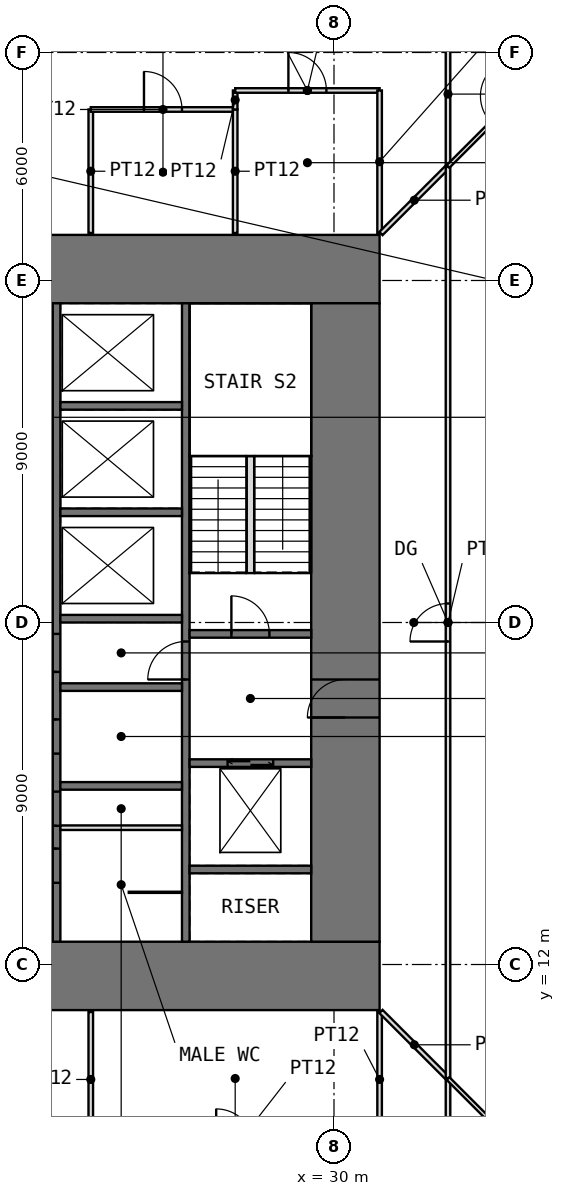
"""IFC4 building model, lengths in metres.
Left out: names, types, materials, properties, quantities, classifications, styles, units other than length and angle.
Written with IfcOpenShell. Run it as: python <this file> out.ifc"""

import sys

from ifc_helpers import new_model, si_unit, direction, frame, frame_2d, origin, place, context, subcontext, project, spatial, rectangle, extrude, element, fill, save


model = new_model("IFC4")
c1 = context("Model", 3, precision=1e-05, world=origin(), true_north=direction((0.0, 1.0)))
c2 = subcontext(c1, "Body", "Model", "MODEL_VIEW")
j1 = project(units=[si_unit("LENGTHUNIT", "METRE"), si_unit("PLANEANGLEUNIT", "RADIAN")], contexts=[c1])
p1 = place(None, origin())
s1 = spatial("IfcSite", under=j1, at=p1, CompositionType="ELEMENT")
p2 = place(p1, origin())
s2 = spatial("IfcBuilding", under=s1, at=p2, CompositionType="ELEMENT")
p3 = place(p2, frame((0.0, 0.0, 34.5)))
s3 = spatial("IfcBuildingStorey", under=s2, at=p3, CompositionType="ELEMENT", Elevation=34.5)
p4 = place(p3, frame((10.8, 11.7, -0.05), z_axis=(0.0, 0.0, 1.0), x_axis=(1.0, 0.0, 0.0)))
e1 = element("IfcWall", 1, at=p4, inside=s3, PredefinedType="SHEAR", context=c2, shape_type="SweptSolid", body=[
    extrude(rectangle(XDim=20.4, YDim=1.8, at=frame_2d((10.2, 0.0))), origin(), (0.0, 0.0, 1.0), 4.0),
])
p5 = place(p4, frame((9.2, 0.0, 0.05)))
e2 = element("IfcOpeningElement", 2, at=p5, cuts=e1, PredefinedType="OPENING", context=c2, shape_type="SweptSolid", body=[
    extrude(rectangle(XDim=2.0, YDim=2.2, at=frame_2d((1.0, 1.1))), frame((0.0, 0.91, 0.0), z_axis=(0.0, -1.0, 0.0), x_axis=(1.0, 0.0, 0.0)), (0.0, 0.0, 1.0), 1.82),
])
p6 = place(p3, frame((10.8, 30.3, -0.05), z_axis=(0.0, 0.0, 1.0), x_axis=(1.0, 0.0, 0.0)))
e3 = element("IfcWall", 3, at=p6, inside=s3, PredefinedType="SHEAR", context=c2, shape_type="SweptSolid", body=[
    extrude(rectangle(XDim=20.4, YDim=1.8, at=frame_2d((10.2, 0.0))), origin(), (0.0, 0.0, 1.0), 4.0),
])
p7 = place(p6, frame((9.2, 0.0, 0.05)))
e4 = element("IfcOpeningElement", 4, at=p7, cuts=e3, PredefinedType="OPENING", context=c2, shape_type="SweptSolid", body=[
    extrude(rectangle(XDim=2.0, YDim=2.2, at=frame_2d((1.0, 1.1))), frame((0.0, 0.91, 0.0), z_axis=(0.0, -1.0, 0.0), x_axis=(1.0, 0.0, 0.0)), (0.0, 0.0, 1.0), 1.82),
])
p8 = place(p3, frame((30.3, 12.6, -0.05), z_axis=(0.0, 0.0, 1.0), x_axis=(0.0, 1.0, 0.0)))
e5 = element("IfcWall", 5, at=p8, inside=s3, PredefinedType="SHEAR", context=c2, shape_type="SweptSolid", body=[
    extrude(rectangle(XDim=16.8, YDim=1.8, at=frame_2d((8.4, 0.0))), origin(), (0.0, 0.0, 1.0), 4.0),
])
p9 = place(p8, frame((5.9, 0.0, 0.05)))
e6 = element("IfcOpeningElement", 6, at=p9, cuts=e5, PredefinedType="OPENING", context=c2, shape_type="SweptSolid", body=[
    extrude(rectangle(XDim=1.0, YDim=2.2, at=frame_2d((0.5, 1.1))), frame((0.0, 0.91, 0.0), z_axis=(0.0, -1.0, 0.0), x_axis=(1.0, 0.0, 0.0)), (0.0, 0.0, 1.0), 1.82),
])
p10 = place(p3, frame((22.7, 12.6, -0.05), z_axis=(0.0, 0.0, 1.0), x_axis=(0.0, 1.0, 0.0)))
e7 = element("IfcWall", 7, at=p10, inside=s3, PredefinedType="SHEAR", context=c2, shape_type="SweptSolid", body=[
    extrude(rectangle(XDim=16.8, YDim=0.2, at=frame_2d((8.4, 0.0))), origin(), (0.0, 0.0, 1.0), 4.0),
])
p11 = place(p10, frame((3.05, 0.0, 0.05)))
e8 = element("IfcOpeningElement", 8, at=p11, cuts=e7, PredefinedType="OPENING", context=c2, shape_type="SweptSolid", body=[
    extrude(rectangle(XDim=0.9, YDim=2.2, at=frame_2d((0.45, 1.1))), frame((0.0, 0.11, 0.0), z_axis=(0.0, -1.0, 0.0), x_axis=(1.0, 0.0, 0.0)), (0.0, 0.0, 1.0), 0.22),
])
p12 = place(p10, frame((7.1, 0.0, 0.05)))
e9 = element("IfcOpeningElement", 9, at=p12, cuts=e7, PredefinedType="OPENING", context=c2, shape_type="SweptSolid", body=[
    extrude(rectangle(XDim=1.0, YDim=2.2, at=frame_2d((0.5, 1.1))), frame((0.0, 0.11, 0.0), z_axis=(0.0, -1.0, 0.0), x_axis=(1.0, 0.0, 0.0)), (0.0, 0.0, 1.0), 0.22),
])
p13 = place(p10, frame((1.55, 0.0, 0.05)))
e10 = element("IfcOpeningElement", 10, at=p13, cuts=e7, PredefinedType="OPENING", context=c2, shape_type="SweptSolid", body=[
    extrude(rectangle(XDim=0.9, YDim=2.2, at=frame_2d((0.45, 1.1))), frame((0.0, 0.11, 0.0), z_axis=(0.0, -1.0, 0.0), x_axis=(1.0, 0.0, 0.0)), (0.0, 0.0, 1.0), 0.22),
])
p14 = place(p10, frame((4.95, 0.0, 0.05)))
e11 = element("IfcOpeningElement", 11, at=p14, cuts=e7, PredefinedType="OPENING", context=c2, shape_type="SweptSolid", body=[
    extrude(rectangle(XDim=0.9, YDim=2.2, at=frame_2d((0.45, 1.1))), frame((0.0, 0.11, 0.0), z_axis=(0.0, -1.0, 0.0), x_axis=(1.0, 0.0, 0.0)), (0.0, 0.0, 1.0), 0.22),
])
p15 = place(p3, frame((26.1, 12.6, -0.05), z_axis=(0.0, 0.0, 1.0), x_axis=(0.0, 1.0, 0.0)))
e12 = element("IfcWall", 12, at=p15, inside=s3, PredefinedType="SHEAR", context=c2, shape_type="SweptSolid", body=[
    extrude(rectangle(XDim=16.8, YDim=0.2, at=frame_2d((8.4, 0.0))), origin(), (0.0, 0.0, 1.0), 4.0),
])
p16 = place(p15, frame((6.9, 0.0, 0.05)))
e13 = element("IfcOpeningElement", 13, at=p16, cuts=e12, PredefinedType="OPENING", context=c2, shape_type="SweptSolid", body=[
    extrude(rectangle(XDim=1.0, YDim=2.2, at=frame_2d((0.5, 1.1))), frame((0.0, 0.11, 0.0), z_axis=(0.0, -1.0, 0.0), x_axis=(1.0, 0.0, 0.0)), (0.0, 0.0, 1.0), 0.22),
])
for number, where, z_axis, x_axis in (
    (14, (22.8, 16.7, -0.05), (0.0, 0.0, 1.0), (1.0, 0.0, 0.0)),
    (15, (22.8, 19.3, -0.05), (0.0, 0.0, 1.0), (1.0, 0.0, 0.0)),
    (16, (22.8, 21.1, -0.05), (0.0, 0.0, 1.0), (1.0, 0.0, 0.0)),
    (17, (22.8, 23.9, -0.05), (0.0, 0.0, 1.0), (1.0, 0.0, 0.0)),
    (18, (22.8, 26.7, -0.05), (0.0, 0.0, 1.0), (1.0, 0.0, 0.0)),
    (19, (26.2, 14.5, -0.05), (0.0, 0.0, 1.0), (1.0, 0.0, 0.0)),
):
    element("IfcWall", number, at=place(p3, frame(where, z_axis=z_axis, x_axis=x_axis)), inside=s3, PredefinedType="SHEAR", context=c2, shape_type="SweptSolid", body=[
        extrude(rectangle(XDim=3.2, YDim=0.2, at=frame_2d((1.6, 0.0))), origin(), (0.0, 0.0, 1.0), 4.0),
    ])
p17 = place(p3, frame((26.2, 17.3, -0.05), z_axis=(0.0, 0.0, 1.0), x_axis=(1.0, 0.0, 0.0)))
e20 = element("IfcWall", 20, at=p17, inside=s3, PredefinedType="SHEAR", context=c2, shape_type="SweptSolid", body=[
    extrude(rectangle(XDim=3.2, YDim=0.2, at=frame_2d((1.6, 0.0))), origin(), (0.0, 0.0, 1.0), 4.0),
])
p18 = place(p17, frame((1.0, 0.0, 0.05)))
e21 = element("IfcOpeningElement", 21, at=p18, cuts=e20, PredefinedType="OPENING", context=c2, shape_type="SweptSolid", body=[
    extrude(rectangle(XDim=1.2, YDim=2.2, at=frame_2d((0.6, 1.1))), frame((0.0, 0.11, 0.0), z_axis=(0.0, -1.0, 0.0), x_axis=(1.0, 0.0, 0.0)), (0.0, 0.0, 1.0), 0.22),
])
p19 = place(p3, frame((26.2, 20.7, -0.05), z_axis=(0.0, 0.0, 1.0), x_axis=(1.0, 0.0, 0.0)))
e22 = element("IfcWall", 22, at=p19, inside=s3, PredefinedType="SHEAR", context=c2, shape_type="SweptSolid", body=[
    extrude(rectangle(XDim=3.2, YDim=0.2, at=frame_2d((1.6, 0.0))), origin(), (0.0, 0.0, 1.0), 4.0),
])
p20 = place(p19, frame((1.1, 0.0, 0.05)))
e23 = element("IfcOpeningElement", 23, at=p20, cuts=e22, PredefinedType="OPENING", context=c2, shape_type="SweptSolid", body=[
    extrude(rectangle(XDim=1.0, YDim=2.2, at=frame_2d((0.5, 1.1))), frame((0.0, 0.11, 0.0), z_axis=(0.0, -1.0, 0.0), x_axis=(1.0, 0.0, 0.0)), (0.0, 0.0, 1.0), 0.22),
])
p21 = place(p3, frame((22.8, 15.6, 0.0), z_axis=(0.0, 0.0, 1.0), x_axis=(1.0, 0.0, 0.0)))
e24 = element("IfcWall", 24, at=p21, inside=s3, PredefinedType="PARTITIONING", context=c2, shape_type="SweptSolid", body=[
    extrude(rectangle(XDim=3.2, YDim=0.12, at=frame_2d((1.6, 0.0))), origin(), (0.0, 0.0, 1.0), 3.75),
])
p22 = place(p3, frame((24.6, 13.9, 0.0), z_axis=(0.0, 0.0, 1.0), x_axis=(1.0, 0.0, 0.0)))
e25 = element("IfcWall", 25, at=p22, inside=s3, PredefinedType="PARTITIONING", context=c2, shape_type="SweptSolid", body=[
    extrude(rectangle(XDim=1.4, YDim=0.03, at=frame_2d((0.7, 0.0))), origin(), (0.0, 0.0, 1.0), 3.75),
])
p23 = place(p3, frame((23.6, 7.2, 0.0), z_axis=(0.0, 0.0, 1.0), x_axis=(0.0, 1.0, 0.0)))
e26 = element("IfcWall", 26, at=p23, inside=s3, PredefinedType="PARTITIONING", context=c2, shape_type="SweptSolid", body=[
    extrude(rectangle(XDim=3.55, YDim=0.12, at=frame_2d((1.775, 0.0))), origin(), (0.0, 0.0, 1.0), 3.75),
])
p24 = place(p3, frame((23.6, 31.25, 0.0), z_axis=(0.0, 0.0, 1.0), x_axis=(0.0, 1.0, 0.0)))
e27 = element("IfcWall", 27, at=p24, inside=s3, PredefinedType="PARTITIONING", context=c2, shape_type="SweptSolid", body=[
    extrude(rectangle(XDim=3.25, YDim=0.12, at=frame_2d((1.625, 0.0))), origin(), (0.0, 0.0, 1.0), 3.75),
])
p25 = place(p3, frame((23.6, 34.5, 0.0), z_axis=(0.0, 0.0, 1.0), x_axis=(1.0, 0.0, 0.0)))
e28 = element("IfcWall", 28, at=p25, inside=s3, PredefinedType="PARTITIONING", context=c2, shape_type="SweptSolid", body=[
    extrude(rectangle(XDim=3.8, YDim=0.12, at=frame_2d((1.9, 0.0))), origin(), (0.0, 0.0, 1.0), 3.75),
])
p26 = place(p25, frame((1.4, 0.0, 0.0)))
e29 = element("IfcOpeningElement", 29, at=p26, cuts=e28, PredefinedType="OPENING", context=c2, shape_type="SweptSolid", body=[
    extrude(rectangle(XDim=1.0, YDim=2.2, at=frame_2d((0.5, 1.1))), frame((0.0, 0.07, 0.0), z_axis=(0.0, -1.0, 0.0), x_axis=(1.0, 0.0, 0.0)), (0.0, 0.0, 1.0), 0.14),
])
p27 = place(p3, frame((27.4, 31.25, 0.0), z_axis=(0.0, 0.0, 1.0), x_axis=(0.0, 1.0, 0.0)))
e30 = element("IfcWall", 30, at=p27, inside=s3, PredefinedType="PARTITIONING", context=c2, shape_type="SweptSolid", body=[
    extrude(rectangle(XDim=3.25, YDim=0.12, at=frame_2d((1.625, 0.0))), origin(), (0.0, 0.0, 1.0), 3.75),
])
p28 = place(p3, frame((27.4, 34.5, 0.0), z_axis=(0.0, 0.0, 1.0), x_axis=(0.0, 1.0, 0.0)))
e31 = element("IfcWall", 31, at=p28, inside=s3, PredefinedType="PARTITIONING", context=c2, shape_type="SweptSolid", body=[
    extrude(rectangle(XDim=0.5, YDim=0.12, at=frame_2d((0.25, 0.0))), origin(), (0.0, 0.0, 1.0), 3.75),
])
p29 = place(p3, frame((27.4, 35.0, 0.0), z_axis=(0.0, 0.0, 1.0), x_axis=(1.0, 0.0, 0.0)))
e32 = element("IfcWall", 32, at=p29, inside=s3, PredefinedType="PARTITIONING", context=c2, shape_type="SweptSolid", body=[
    extrude(rectangle(XDim=3.8, YDim=0.12, at=frame_2d((1.9, 0.0))), origin(), (0.0, 0.0, 1.0), 3.75),
])
p30 = place(p29, frame((1.4, 0.0, 0.0)))
e33 = element("IfcOpeningElement", 33, at=p30, cuts=e32, PredefinedType="OPENING", context=c2, shape_type="SweptSolid", body=[
    extrude(rectangle(XDim=1.0, YDim=2.4, at=frame_2d((0.5, 1.2))), frame((0.0, 0.07, 0.0), z_axis=(0.0, -1.0, 0.0), x_axis=(1.0, 0.0, 0.0)), (0.0, 0.0, 1.0), 0.14),
])
p31 = place(p3, frame((31.2, 7.2, 0.0), z_axis=(0.0, 0.0, 1.0), x_axis=(0.0, 1.0, 0.0)))
e34 = element("IfcWall", 34, at=p31, inside=s3, PredefinedType="PARTITIONING", context=c2, shape_type="SweptSolid", body=[
    extrude(rectangle(XDim=3.55, YDim=0.12, at=frame_2d((1.775, 0.0))), origin(), (0.0, 0.0, 1.0), 3.75),
])
p32 = place(p3, frame((31.2, 31.25, 0.0), z_axis=(0.0, 0.0, 1.0), x_axis=(0.0, 1.0, 0.0)))
e35 = element("IfcWall", 35, at=p32, inside=s3, PredefinedType="PARTITIONING", context=c2, shape_type="SweptSolid", body=[
    extrude(rectangle(XDim=3.75, YDim=0.12, at=frame_2d((1.875, 0.0))), origin(), (0.0, 0.0, 1.0), 3.75),
])
for number, where, z_axis, x_axis in (
    (36, (31.235, 10.765, 0.0), (0.0, 0.0, 1.0), (0.707, -0.707, 0.0)),
    (37, (31.235, 31.235, 0.0), (0.0, 0.0, 1.0), (0.707, 0.707, 0.0)),
):
    element("IfcWall", number, at=place(p3, frame(where, z_axis=z_axis, x_axis=x_axis)), inside=s3, PredefinedType="PARTITIONING", context=c2, shape_type="SweptSolid", body=[
        extrude(rectangle(XDim=2.481, YDim=0.12, at=frame_2d((1.241, 0.0))), origin(), (0.0, 0.0, 1.0), 3.75),
    ])
p33 = place(p3, frame((33.0, 5.4, 0.0), z_axis=(0.0, 0.0, 1.0), x_axis=(0.0, 1.0, 0.0)))
e38 = element("IfcWall", 38, at=p33, inside=s3, PredefinedType="PARTITIONING", context=c2, shape_type="SweptSolid", body=[
    extrude(rectangle(XDim=3.59, YDim=0.12, at=frame_2d((1.795, 0.0))), origin(), (0.0, 0.0, 1.0), 3.75),
])
p34 = place(p3, frame((33.0, 9.01, 0.0), z_axis=(0.0, 0.0, 1.0), x_axis=(0.0, 1.0, 0.0)))
e39 = element("IfcWall", 39, at=p34, inside=s3, PredefinedType="PARTITIONING", context=c2, shape_type="SweptSolid", body=[
    extrude(rectangle(XDim=23.98, YDim=0.12, at=frame_2d((11.99, 0.0))), origin(), (0.0, 0.0, 1.0), 3.75),
])
p35 = place(p34, frame((11.49, 0.0, 0.0)))
e40 = element("IfcOpeningElement", 40, at=p35, cuts=e39, PredefinedType="OPENING", context=c2, shape_type="SweptSolid", body=[
    extrude(rectangle(XDim=1.0, YDim=2.4, at=frame_2d((0.5, 1.2))), frame((0.0, 0.07, 0.0), z_axis=(0.0, -1.0, 0.0), x_axis=(1.0, 0.0, 0.0)), (0.0, 0.0, 1.0), 0.14),
])
p36 = place(p3, frame((33.0, 33.01, 0.0), z_axis=(0.0, 0.0, 1.0), x_axis=(0.0, 1.0, 0.0)))
e41 = element("IfcWall", 41, at=p36, inside=s3, PredefinedType="PARTITIONING", context=c2, shape_type="SweptSolid", body=[
    extrude(rectangle(XDim=3.79, YDim=0.12, at=frame_2d((1.895, 0.0))), origin(), (0.0, 0.0, 1.0), 3.75),
])
p37 = place(p3, frame((33.0, 9.0, 0.0), z_axis=(0.0, 0.0, 1.0), x_axis=(0.707106781187, -0.707106781187, 0.0)))
e42 = element("IfcWall", 42, at=p37, inside=s3, PredefinedType="PARTITIONING", context=c2, shape_type="SweptSolid", body=[
    extrude(rectangle(XDim=4.243, YDim=0.1, at=frame_2d((2.121, 0.0))), origin(), (0.0, 0.0, 1.0), 3.75),
])
p38 = place(p37, frame((1.621, 0.0, 0.0)))
e43 = element("IfcOpeningElement", 43, at=p38, cuts=e42, PredefinedType="OPENING", context=c2, shape_type="SweptSolid", body=[
    extrude(rectangle(XDim=1.0, YDim=2.4, at=frame_2d((0.5, 1.2))), frame((0.0, 0.06, 0.0), z_axis=(0.0, -1.0, 0.0), x_axis=(1.0, 0.0, 0.0)), (0.0, 0.0, 1.0), 0.12),
])
p39 = place(p3, frame((33.0, 33.0, 0.0), z_axis=(0.0, 0.0, 1.0), x_axis=(0.707106781187, 0.707106781187, 0.0)))
e44 = element("IfcWall", 44, at=p39, inside=s3, PredefinedType="PARTITIONING", context=c2, shape_type="SweptSolid", body=[
    extrude(rectangle(XDim=4.243, YDim=0.1, at=frame_2d((2.121, 0.0))), origin(), (0.0, 0.0, 1.0), 3.75),
])
p40 = place(p39, frame((1.621, 0.0, 0.0)))
e45 = element("IfcOpeningElement", 45, at=p40, cuts=e44, PredefinedType="OPENING", context=c2, shape_type="SweptSolid", body=[
    extrude(rectangle(XDim=1.0, YDim=2.4, at=frame_2d((0.5, 1.2))), frame((0.0, 0.06, 0.0), z_axis=(0.0, -1.0, 0.0), x_axis=(1.0, 0.0, 0.0)), (0.0, 0.0, 1.0), 0.12),
])
p41 = place(p3, frame((27.8, 22.3, 0.0), z_axis=(0.0, 0.0, 1.0), x_axis=(0.0, 1.0, 0.0)))
e46 = element("IfcWall", 46, at=p41, inside=s3, PredefinedType="PARTITIONING", context=c2, shape_type="SweptSolid", body=[
    extrude(rectangle(XDim=3.08, YDim=0.2, at=frame_2d((1.54, 0.0))), origin(), (0.0, 0.0, 1.0), 4.0),
])
p42 = place(p11, origin())
e47 = element("IfcDoor", 47, at=p42, inside=s3, OperationType="SINGLE_SWING_LEFT", PredefinedType="DOOR", context=c2, shape_type="SweptSolid", body=[
    extrude(rectangle(XDim=0.9, YDim=2.2, at=frame_2d((0.45, 1.1))), frame((0.0, 0.025, 0.0), z_axis=(0.0, -1.0, 0.0), x_axis=(1.0, 0.0, 0.0)), (0.0, 0.0, 1.0), 0.05),
])
fill(e8, e47)
p43 = place(p9, origin())
e48 = element("IfcDoor", 48, at=p43, inside=s3, OperationType="SINGLE_SWING_LEFT", PredefinedType="DOOR", context=c2, shape_type="SweptSolid", body=[
    extrude(rectangle(XDim=1.0, YDim=2.2, at=frame_2d((0.5, 1.1))), frame((0.0, 0.025, 0.0), z_axis=(0.0, -1.0, 0.0), x_axis=(1.0, 0.0, 0.0)), (0.0, 0.0, 1.0), 0.05),
])
fill(e6, e48)
p44 = place(p20, origin())
e49 = element("IfcDoor", 49, at=p44, inside=s3, OperationType="SINGLE_SWING_LEFT", PredefinedType="DOOR", context=c2, shape_type="SweptSolid", body=[
    extrude(rectangle(XDim=1.0, YDim=2.2, at=frame_2d((0.5, 1.1))), frame((0.0, 0.025, 0.0), z_axis=(0.0, -1.0, 0.0), x_axis=(1.0, 0.0, 0.0)), (0.0, 0.0, 1.0), 0.05),
])
fill(e23, e49)
p45 = place(p16, origin())
e50 = element("IfcDoor", 50, at=p45, inside=s3, OperationType="SINGLE_SWING_LEFT", PredefinedType="DOOR", context=c2, shape_type="SweptSolid", body=[
    extrude(rectangle(XDim=1.0, YDim=2.2, at=frame_2d((0.5, 1.1))), frame((0.0, 0.025, 0.0), z_axis=(0.0, -1.0, 0.0), x_axis=(1.0, 0.0, 0.0)), (0.0, 0.0, 1.0), 0.05),
])
fill(e13, e50)
p46 = place(p12, origin())
e51 = element("IfcDoor", 51, at=p46, inside=s3, OperationType="SINGLE_SWING_LEFT", PredefinedType="DOOR", context=c2, shape_type="SweptSolid", body=[
    extrude(rectangle(XDim=1.0, YDim=2.2, at=frame_2d((0.5, 1.1))), frame((0.0, 0.025, 0.0), z_axis=(0.0, -1.0, 0.0), x_axis=(1.0, 0.0, 0.0)), (0.0, 0.0, 1.0), 0.05),
])
fill(e9, e51)
p47 = place(p13, origin())
e52 = element("IfcDoor", 52, at=p47, inside=s3, OperationType="SINGLE_SWING_RIGHT", PredefinedType="DOOR", context=c2, shape_type="SweptSolid", body=[
    extrude(rectangle(XDim=0.9, YDim=2.2, at=frame_2d((0.45, 1.1))), frame((0.0, 0.025, 0.0), z_axis=(0.0, -1.0, 0.0), x_axis=(1.0, 0.0, 0.0)), (0.0, 0.0, 1.0), 0.05),
])
fill(e10, e52)
p48 = place(p14, origin())
e53 = element("IfcDoor", 53, at=p48, inside=s3, OperationType="SINGLE_SWING_RIGHT", PredefinedType="DOOR", context=c2, shape_type="SweptSolid", body=[
    extrude(rectangle(XDim=0.9, YDim=2.2, at=frame_2d((0.45, 1.1))), frame((0.0, 0.025, 0.0), z_axis=(0.0, -1.0, 0.0), x_axis=(1.0, 0.0, 0.0)), (0.0, 0.0, 1.0), 0.05),
])
fill(e11, e53)
p49 = place(p26, origin())
e54 = element("IfcDoor", 54, at=p49, inside=s3, OperationType="SINGLE_SWING_LEFT", PredefinedType="DOOR", context=c2, shape_type="SweptSolid", body=[
    extrude(rectangle(XDim=1.0, YDim=2.2, at=frame_2d((0.5, 1.1))), frame((0.0, 0.025, 0.0), z_axis=(0.0, -1.0, 0.0), x_axis=(1.0, 0.0, 0.0)), (0.0, 0.0, 1.0), 0.05),
])
fill(e29, e54)
p50 = place(p30, origin())
e55 = element("IfcDoor", 55, at=p50, inside=s3, OperationType="SINGLE_SWING_LEFT", PredefinedType="DOOR", context=c2, shape_type="SweptSolid", body=[
    extrude(rectangle(XDim=1.0, YDim=2.4, at=frame_2d((0.5, 1.2))), frame((0.0, 0.025, 0.0), z_axis=(0.0, -1.0, 0.0), x_axis=(1.0, 0.0, 0.0)), (0.0, 0.0, 1.0), 0.05),
])
fill(e33, e55)
p51 = place(p35, origin())
e56 = element("IfcDoor", 56, at=p51, inside=s3, OperationType="SINGLE_SWING_LEFT", PredefinedType="DOOR", context=c2, shape_type="SweptSolid", body=[
    extrude(rectangle(XDim=1.0, YDim=2.4, at=frame_2d((0.5, 1.2))), frame((0.0, 0.025, 0.0), z_axis=(0.0, -1.0, 0.0), x_axis=(1.0, 0.0, 0.0)), (0.0, 0.0, 1.0), 0.05),
])
fill(e40, e56)
p52 = place(p18, origin())
e57 = element("IfcDoor", 57, at=p52, inside=s3, OperationType="DOUBLE_DOOR_SLIDING", PredefinedType="DOOR", context=c2, shape_type="SweptSolid", body=[
    extrude(rectangle(XDim=1.2, YDim=2.2, at=frame_2d((0.6, 1.1))), frame((0.0, 0.025, 0.0), z_axis=(0.0, -1.0, 0.0), x_axis=(1.0, 0.0, 0.0)), (0.0, 0.0, 1.0), 0.05),
])
fill(e21, e57)
save(model, sys.argv[1])
